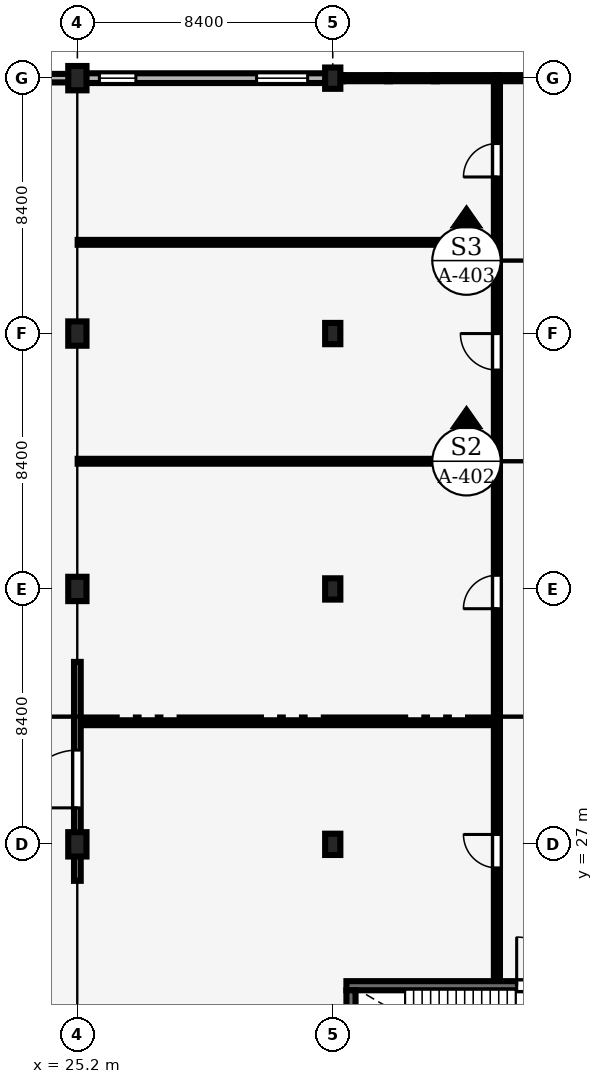
"""IFC4 building model, lengths in metres.
Left out: names, types, materials, properties, quantities, classifications, styles, units other than length and angle.
Written with IfcOpenShell. Run it as: python <this file> out.ifc"""

import sys

from ifc_helpers import new_model, si_unit, direction, frame, frame_2d, origin, origin_2d, place, context, subcontext, project, spatial, rectangle, extrude, element, fill, save


model = new_model("IFC4")
c1 = context("Model", 3, precision=1e-05, world=origin(), true_north=direction((0.0, 1.0)))
c2 = subcontext(c1, "Body", "Model", "MODEL_VIEW")
j1 = project(units=[si_unit("LENGTHUNIT", "METRE"), si_unit("PLANEANGLEUNIT", "RADIAN")], contexts=[c1])
p1 = place(None, origin())
s1 = spatial("IfcSite", under=j1, at=p1, CompositionType="ELEMENT")
p2 = place(p1, origin())
s2 = spatial("IfcBuilding", under=s1, at=p2, CompositionType="ELEMENT")
p3 = place(p2, origin())
s3 = spatial("IfcBuildingStorey", under=s2, at=p3, CompositionType="ELEMENT", Elevation=0.0)
for number, where, z_axis, x_axis in (
    (1, (25.2, 27.0, 0.0), (0.0, 0.0, 1.0), (1.0, 0.0, 0.0)),
    (2, (25.2, 35.4, 0.0), (0.0, 0.0, 1.0), (1.0, 0.0, 0.0)),
    (3, (25.2, 43.8, 0.0), (0.0, 0.0, 1.0), (1.0, 0.0, 0.0)),
    (4, (25.2, 52.2, 0.0), (0.0, 0.0, 1.0), (1.0, 0.0, 0.0)),
):
    element("IfcColumn", number, at=place(p3, frame(where, z_axis=z_axis, x_axis=x_axis)), inside=s3, PredefinedType="COLUMN", context=c2, shape_type="SweptSolid", body=[
        extrude(rectangle(XDim=0.6, YDim=0.8, at=origin_2d()), origin(), (0.0, 0.0, 1.0), 4.8),
    ])
for number, where, z_axis, x_axis in (
    (5, (33.6, 27.0, 0.0), (0.0, 0.0, 1.0), (1.0, 0.0, 0.0)),
    (6, (33.6, 35.4, 0.0), (0.0, 0.0, 1.0), (1.0, 0.0, 0.0)),
    (7, (33.6, 43.8, 0.0), (0.0, 0.0, 1.0), (1.0, 0.0, 0.0)),
    (8, (33.6, 52.2, 0.0), (0.0, 0.0, 1.0), (1.0, 0.0, 0.0)),
):
    element("IfcColumn", number, at=place(p3, frame(where, z_axis=z_axis, x_axis=x_axis)), inside=s3, PredefinedType="COLUMN", context=c2, shape_type="SweptSolid", body=[
        extrude(rectangle(XDim=0.5, YDim=0.7, at=origin_2d()), origin(), (0.0, 0.0, 1.0), 4.8),
    ])
p4 = place(p3, frame((25.475, 52.2, 0.0), z_axis=(0.0, 0.0, 1.0), x_axis=(1.0, 0.0, 0.0)))
e9 = element("IfcWall", 9, at=p4, inside=s3, PredefinedType="SOLIDWALL", context=c2, shape_type="SweptSolid", body=[
    extrude(rectangle(XDim=7.9, YDim=0.32, at=frame_2d((3.95, 0.0))), origin(), (0.0, 0.0, 1.0), 3.87),
])
p5 = place(p4, frame((0.45, 0.0, 0.9)))
e10 = element("IfcOpeningElement", 10, at=p5, cuts=e9, PredefinedType="OPENING", context=c2, shape_type="SweptSolid", body=[
    extrude(rectangle(XDim=1.2, YDim=1.8, at=frame_2d((0.6, 0.9))), frame((0.0, 0.17, 0.0), z_axis=(0.0, -1.0, 0.0), x_axis=(1.0, 0.0, 0.0)), (0.0, 0.0, 1.0), 0.34),
])
p6 = place(p4, frame((5.62, 0.0, 0.9)))
e11 = element("IfcOpeningElement", 11, at=p6, cuts=e9, PredefinedType="OPENING", context=c2, shape_type="SweptSolid", body=[
    extrude(rectangle(XDim=1.68, YDim=2.4, at=frame_2d((0.84, 1.2))), frame((0.0, 0.17, 0.0), z_axis=(0.0, -1.0, 0.0), x_axis=(1.0, 0.0, 0.0)), (0.0, 0.0, 1.0), 0.34),
])
p7 = place(p3, frame((17.075, 52.2, 0.0), z_axis=(0.0, 0.0, 1.0), x_axis=(1.0, 0.0, 0.0)))
e12 = element("IfcWall", 12, at=p7, inside=s3, PredefinedType="SOLIDWALL", context=c2, shape_type="SweptSolid", body=[
    extrude(rectangle(XDim=7.85, YDim=0.28, at=frame_2d((3.925, 0.0))), origin(), (0.0, 0.0, 1.0), 4.267),
])
p8 = place(p3, frame((34.05, 22.35, 0.0), z_axis=(0.0, 0.0, 1.0), x_axis=(1.0, 0.0, 0.0)))
e13 = element("IfcWall", 13, at=p8, inside=s3, PredefinedType="SHEAR", context=c2, shape_type="SweptSolid", body=[
    extrude(rectangle(XDim=7.5, YDim=0.3, at=frame_2d((3.75, 0.0))), origin(), (0.0, 0.0, 1.0), 4.625),
])
p9 = place(p8, frame((5.6, 0.0, 0.0)))
e14 = element("IfcOpeningElement", 14, at=p9, cuts=e13, PredefinedType="OPENING", context=c2, shape_type="SweptSolid", body=[
    extrude(rectangle(XDim=1.6, YDim=2.2, at=frame_2d((0.8, 1.1))), frame((0.0, 0.16, 0.0), z_axis=(0.0, -1.0, 0.0), x_axis=(1.0, 0.0, 0.0)), (0.0, 0.0, 1.0), 0.32),
])
p10 = place(p3, frame((34.2, 18.3, 0.0), z_axis=(0.0, 0.0, 1.0), x_axis=(0.0, 1.0, 0.0)))
e15 = element("IfcWall", 15, at=p10, inside=s3, PredefinedType="SHEAR", context=c2, shape_type="SweptSolid", body=[
    extrude(rectangle(XDim=3.9, YDim=0.3, at=frame_2d((1.95, 0.0))), origin(), (0.0, 0.0, 1.0), 4.625),
])
for number, where, z_axis, x_axis in (
    (16, (25.21, 31.0, 0.0), (0.0, 0.0, 1.0), (1.0, 0.0, 0.0)),
    (17, (25.21, 39.6, 0.0), (0.0, 0.0, 1.0), (1.0, 0.0, 0.0)),
):
    element("IfcWall", number, at=place(p3, frame(where, z_axis=z_axis, x_axis=x_axis)), inside=s3, PredefinedType="PARTITIONING", context=c2, shape_type="SweptSolid", body=[
        extrude(rectangle(XDim=13.685, YDim=0.16, at=frame_2d((6.843, 0.0))), origin(), (0.0, 0.0, 1.0), 4.5),
    ])
p11 = place(p3, frame((25.21, 46.8, 0.0), z_axis=(0.0, 0.0, 1.0), x_axis=(1.0, 0.0, 0.0)))
e18 = element("IfcWall", 18, at=p11, inside=s3, PredefinedType="PARTITIONING", context=c2, shape_type="SweptSolid", body=[
    extrude(rectangle(XDim=13.685, YDim=0.16, at=frame_2d((6.843, 0.0))), origin(), (0.0, 0.0, 1.0), 4.114),
])
p12 = place(p3, frame((39.0, 22.56, 0.0), z_axis=(0.0, 0.0, 1.0), x_axis=(0.0, 1.0, 0.0)))
e19 = element("IfcWall", 19, at=p12, inside=s3, PredefinedType="PARTITIONING", context=c2, shape_type="SweptSolid", body=[
    extrude(rectangle(XDim=29.535, YDim=0.2, at=frame_2d((14.768, 0.0))), origin(), (0.0, 0.0, 1.0), 4.5),
])
p13 = place(p12, frame((3.665, 0.0, 0.0)))
e20 = element("IfcOpeningElement", 20, at=p13, cuts=e19, PredefinedType="OPENING", context=c2, shape_type="SweptSolid", body=[
    extrude(rectangle(XDim=1.1, YDim=2.15, at=frame_2d((0.55, 1.075))), frame((0.0, 0.11, 0.0), z_axis=(0.0, -1.0, 0.0), x_axis=(1.0, 0.0, 0.0)), (0.0, 0.0, 1.0), 0.22),
])
p14 = place(p12, frame((12.19, 0.0, 0.0)))
e21 = element("IfcOpeningElement", 21, at=p14, cuts=e19, PredefinedType="OPENING", context=c2, shape_type="SweptSolid", body=[
    extrude(rectangle(XDim=1.1, YDim=2.15, at=frame_2d((0.55, 1.075))), frame((0.0, 0.11, 0.0), z_axis=(0.0, -1.0, 0.0), x_axis=(1.0, 0.0, 0.0)), (0.0, 0.0, 1.0), 0.22),
])
p15 = place(p12, frame((20.04, 0.0, 0.0)))
e22 = element("IfcOpeningElement", 22, at=p15, cuts=e19, PredefinedType="OPENING", context=c2, shape_type="SweptSolid", body=[
    extrude(rectangle(XDim=1.2, YDim=2.2, at=frame_2d((0.6, 1.1))), frame((0.0, 0.11, 0.0), z_axis=(0.0, -1.0, 0.0), x_axis=(1.0, 0.0, 0.0)), (0.0, 0.0, 1.0), 0.22),
])
p16 = place(p12, frame((26.39, 0.0, 0.0)))
e23 = element("IfcOpeningElement", 23, at=p16, cuts=e19, PredefinedType="OPENING", context=c2, shape_type="SweptSolid", body=[
    extrude(rectangle(XDim=1.1, YDim=2.15, at=frame_2d((0.55, 1.075))), frame((0.0, 0.11, 0.0), z_axis=(0.0, -1.0, 0.0), x_axis=(1.0, 0.0, 0.0)), (0.0, 0.0, 1.0), 0.22),
])
p17 = place(p3, frame((25.2, 25.8, 0.0), z_axis=(0.0, 0.0, 1.0), x_axis=(0.0, 1.0, 0.0)))
e24 = element("IfcWall", 24, at=p17, inside=s3, PredefinedType="SOLIDWALL", context=c2, shape_type="SweptSolid", body=[
    extrude(rectangle(XDim=7.2, YDim=0.22, at=frame_2d((3.6, 0.0))), origin(), (0.0, 0.0, 1.0), 3.912),
])
p18 = place(p17, frame((2.4, 0.0, 0.0)))
e25 = element("IfcOpeningElement", 25, at=p18, cuts=e24, PredefinedType="OPENING", context=c2, shape_type="SweptSolid", body=[
    extrude(rectangle(XDim=1.9, YDim=2.4, at=frame_2d((0.95, 1.2))), frame((0.0, 0.12, 0.0), z_axis=(0.0, -1.0, 0.0), x_axis=(1.0, 0.0, 0.0)), (0.0, 0.0, 1.0), 0.24),
])
p19 = place(p5, origin())
e26 = element("IfcWindow", 26, at=p19, inside=s3, PartitioningType="SINGLE_PANEL", PredefinedType="WINDOW", context=c2, shape_type="SweptSolid", body=[
    extrude(rectangle(XDim=1.2, YDim=1.8, at=frame_2d((0.6, 0.9))), frame((0.0, 0.03, 0.0), z_axis=(0.0, -1.0, 0.0), x_axis=(1.0, 0.0, 0.0)), (0.0, 0.0, 1.0), 0.06),
])
fill(e10, e26)
p20 = place(p6, origin())
e27 = element("IfcWindow", 27, at=p20, inside=s3, PartitioningType="SINGLE_PANEL", PredefinedType="WINDOW", context=c2, shape_type="SweptSolid", body=[
    extrude(rectangle(XDim=1.68, YDim=2.4, at=frame_2d((0.84, 1.2))), frame((0.0, 0.03, 0.0), z_axis=(0.0, -1.0, 0.0), x_axis=(1.0, 0.0, 0.0)), (0.0, 0.0, 1.0), 0.06),
])
fill(e11, e27)
p21 = place(p9, origin())
e28 = element("IfcDoor", 28, at=p21, inside=s3, OperationType="DOUBLE_DOOR_SINGLE_SWING", PredefinedType="DOOR", context=c2, shape_type="SweptSolid", body=[
    extrude(rectangle(XDim=1.6, YDim=2.2, at=frame_2d((0.8, 1.1))), frame((0.0, 0.025, 0.0), z_axis=(0.0, -1.0, 0.0), x_axis=(1.0, 0.0, 0.0)), (0.0, 0.0, 1.0), 0.05),
])
fill(e14, e28)
p22 = place(p13, origin())
e29 = element("IfcDoor", 29, at=p22, inside=s3, OperationType="SINGLE_SWING_RIGHT", PredefinedType="DOOR", context=c2, shape_type="SweptSolid", body=[
    extrude(rectangle(XDim=1.1, YDim=2.15, at=frame_2d((0.55, 1.075))), frame((0.0, 0.025, 0.0), z_axis=(0.0, -1.0, 0.0), x_axis=(1.0, 0.0, 0.0)), (0.0, 0.0, 1.0), 0.05),
])
fill(e20, e29)
p23 = place(p14, origin())
e30 = element("IfcDoor", 30, at=p23, inside=s3, OperationType="SINGLE_SWING_LEFT", PredefinedType="DOOR", context=c2, shape_type="SweptSolid", body=[
    extrude(rectangle(XDim=1.1, YDim=2.15, at=frame_2d((0.55, 1.075))), frame((0.0, 0.025, 0.0), z_axis=(0.0, -1.0, 0.0), x_axis=(1.0, 0.0, 0.0)), (0.0, 0.0, 1.0), 0.05),
])
fill(e21, e30)
p24 = place(p15, origin())
e31 = element("IfcDoor", 31, at=p24, inside=s3, OperationType="SINGLE_SWING_RIGHT", PredefinedType="DOOR", context=c2, shape_type="SweptSolid", body=[
    extrude(rectangle(XDim=1.2, YDim=2.2, at=frame_2d((0.6, 1.1))), frame((0.0, 0.025, 0.0), z_axis=(0.0, -1.0, 0.0), x_axis=(1.0, 0.0, 0.0)), (0.0, 0.0, 1.0), 0.05),
])
fill(e22, e31)
p25 = place(p16, origin())
e32 = element("IfcDoor", 32, at=p25, inside=s3, OperationType="SINGLE_SWING_LEFT", PredefinedType="DOOR", context=c2, shape_type="SweptSolid", body=[
    extrude(rectangle(XDim=1.1, YDim=2.15, at=frame_2d((0.55, 1.075))), frame((0.0, 0.025, 0.0), z_axis=(0.0, -1.0, 0.0), x_axis=(1.0, 0.0, 0.0)), (0.0, 0.0, 1.0), 0.05),
])
fill(e23, e32)
p26 = place(p18, origin())
e33 = element("IfcDoor", 33, at=p26, inside=s3, OperationType="DOUBLE_DOOR_SINGLE_SWING", PredefinedType="DOOR", context=c2, shape_type="SweptSolid", body=[
    extrude(rectangle(XDim=1.9, YDim=2.4, at=frame_2d((0.95, 1.2))), frame((0.0, 0.025, 0.0), z_axis=(0.0, -1.0, 0.0), x_axis=(1.0, 0.0, 0.0)), (0.0, 0.0, 1.0), 0.05),
])
fill(e25, e33)
save(model, sys.argv[1])
